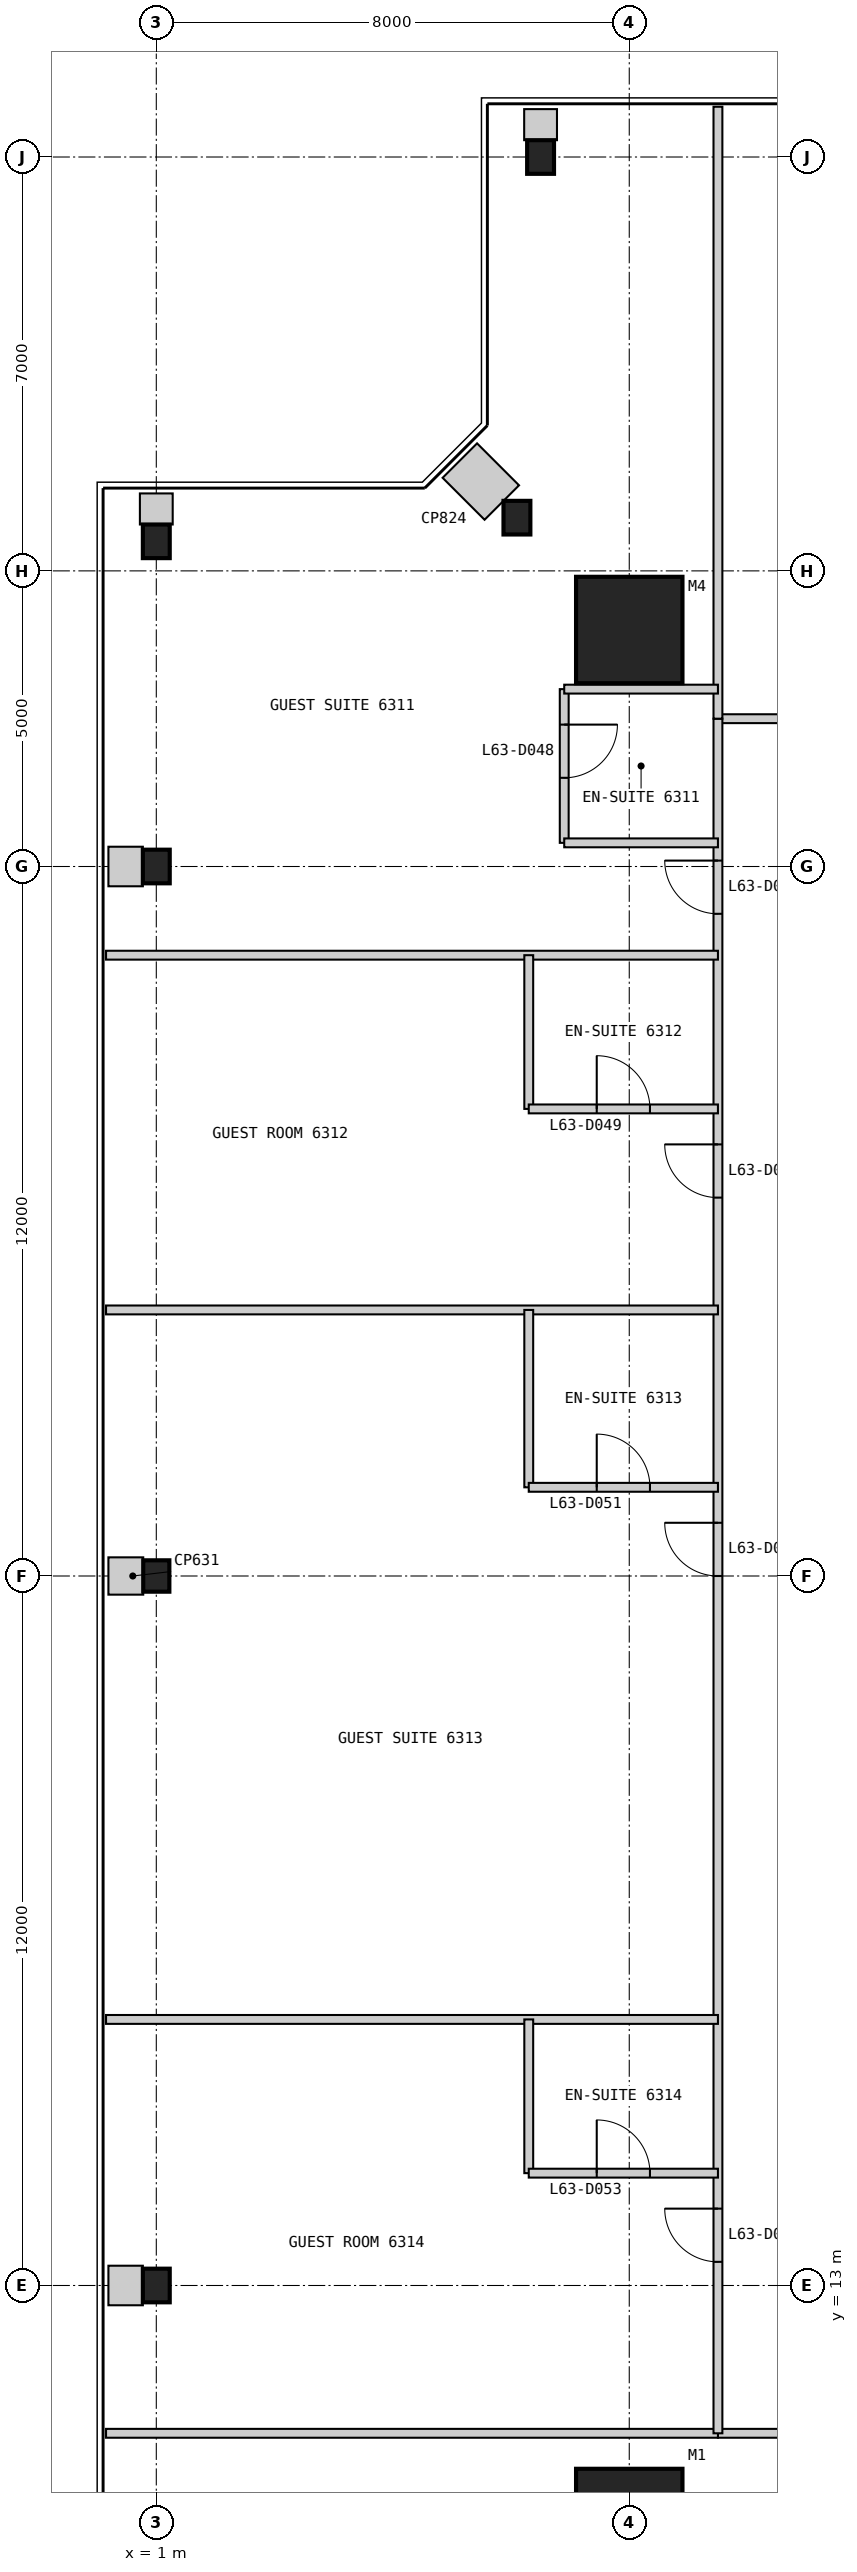
"""IFC4 building model, lengths in metres.
Left out: names, types, materials, properties, quantities, classifications, styles, units other than length and angle.
Written with IfcOpenShell. Run it as: python <this file> out.ifc"""

import sys

from ifc_helpers import new_model, si_unit, direction, frame, frame_2d, origin, origin_2d, place, context, subcontext, project, spatial, rectangle, i_section, extrude, element, fill, save


model = new_model("IFC4")
c1 = context("Model", 3, precision=1e-05, world=origin(), true_north=direction((0.0, 1.0)))
c2 = subcontext(c1, "Body", "Model", "MODEL_VIEW")
j1 = project(units=[si_unit("LENGTHUNIT", "METRE"), si_unit("PLANEANGLEUNIT", "RADIAN")], contexts=[c1])
p1 = place(None, origin())
s1 = spatial("IfcSite", under=j1, at=p1, CompositionType="ELEMENT")
p2 = place(p1, origin())
s2 = spatial("IfcBuilding", under=s1, at=p2, CompositionType="ELEMENT")
p3 = place(p2, frame((0.0, 0.0, 266.2)))
s3 = spatial("IfcBuildingStorey", under=s2, at=p3, CompositionType="ELEMENT", Elevation=266.2)
for number, where, z_axis, x_axis in (
    (1, (9.0, 9.0, 0.0), (0.0, 0.0, 1.0), (1.0, 0.0, 0.0)),
    (2, (9.0, 41.0, 0.0), (0.0, 0.0, 1.0), (1.0, 0.0, 0.0)),
):
    element("IfcColumn", number, at=place(p3, frame(where, z_axis=z_axis, x_axis=x_axis)), inside=s3, PredefinedType="COLUMN", context=c2, shape_type="SweptSolid", body=[
        extrude(rectangle(XDim=1.8, YDim=1.8, at=origin_2d()), origin(), (0.0, 0.0, 1.0), 3.4),
    ])
for number, where, z_axis, x_axis in (
    (3, (7.5, 49.0, 0.0), (0.0, 0.0, 1.0), (1.0, 0.0, 0.0)),
    (4, (7.1, 42.9, 0.0), (0.0, 0.0, 1.0), (1.0, 0.0, 0.0)),
    (5, (1.0, 42.5, 0.0), (0.0, 0.0, 1.0), (1.0, 0.0, 0.0)),
    (6, (1.0, 37.0, 0.0), (0.0, 0.0, 1.0), (1.0, 0.0, 0.0)),
):
    element("IfcColumn", number, at=place(p3, frame(where, z_axis=z_axis, x_axis=x_axis)), inside=s3, PredefinedType="COLUMN", context=c2, shape_type="SweptSolid", body=[
        extrude(i_section(OverallWidth=0.455, OverallDepth=0.569, WebThickness=0.078, FlangeThickness=0.125, at=origin_2d()), origin(), (0.0, 0.0, 1.0), 3.4),
    ])
p4 = place(p3, frame((1.0, 25.0, 0.0), z_axis=(0.0, 0.0, 1.0), x_axis=(1.0, 0.0, 0.0)))
e7 = element("IfcColumn", 7, at=p4, inside=s3, PredefinedType="COLUMN", context=c2, shape_type="SweptSolid", body=[
    extrude(i_section(OverallWidth=0.442, OverallDepth=0.531, WebThickness=0.066, FlangeThickness=0.106, at=origin_2d()), origin(), (0.0, 0.0, 1.0), 3.4),
])
p5 = place(p3, frame((1.0, 13.0, 0.0), z_axis=(0.0, 0.0, 1.0), x_axis=(1.0, 0.0, 0.0)))
e8 = element("IfcColumn", 8, at=p5, inside=s3, PredefinedType="COLUMN", context=c2, shape_type="SweptSolid", body=[
    extrude(i_section(OverallWidth=0.455, OverallDepth=0.569, WebThickness=0.078, FlangeThickness=0.125, at=origin_2d()), origin(), (0.0, 0.0, 1.0), 3.4),
])
p6 = place(p3, frame((10.5, 10.5, 0.0), z_axis=(0.0, 0.0, 1.0), x_axis=(1.0, 0.0, 0.0)))
e9 = element("IfcWall", 9, at=p6, inside=s3, PredefinedType="PARTITIONING", context=c2, shape_type="SweptSolid", body=[
    extrude(rectangle(XDim=29.0, YDim=0.15, at=frame_2d((14.5, 0.0))), origin(), (0.0, 0.0, 1.0), 3.25),
])
p7 = place(p6, frame((1.85, 0.0, 0.0)))
e10 = element("IfcOpeningElement", 10, at=p7, cuts=e9, PredefinedType="OPENING", context=c2, shape_type="SweptSolid", body=[
    extrude(rectangle(XDim=1.0, YDim=2.1, at=frame_2d((0.5, 1.05))), frame((0.0, 0.085, 0.0), z_axis=(0.0, -1.0, 0.0), x_axis=(1.0, 0.0, 0.0)), (0.0, 0.0, 1.0), 0.17),
])
p8 = place(p6, frame((14.5, 0.0, 0.0)))
e11 = element("IfcOpeningElement", 11, at=p8, cuts=e9, PredefinedType="OPENING", context=c2, shape_type="SweptSolid", body=[
    extrude(rectangle(XDim=1.0, YDim=2.1, at=frame_2d((0.5, 1.05))), frame((0.0, 0.085, 0.0), z_axis=(0.0, -1.0, 0.0), x_axis=(1.0, 0.0, 0.0)), (0.0, 0.0, 1.0), 0.17),
])
p9 = place(p6, frame((19.2, 0.0, 0.0)))
e12 = element("IfcOpeningElement", 12, at=p9, cuts=e9, PredefinedType="OPENING", context=c2, shape_type="SweptSolid", body=[
    extrude(rectangle(XDim=0.9, YDim=2.1, at=frame_2d((0.45, 1.05))), frame((0.0, 0.085, 0.0), z_axis=(0.0, -1.0, 0.0), x_axis=(1.0, 0.0, 0.0)), (0.0, 0.0, 1.0), 0.17),
])
p10 = place(p6, frame((25.2, 0.0, 0.0)))
e13 = element("IfcOpeningElement", 13, at=p10, cuts=e9, PredefinedType="OPENING", context=c2, shape_type="SweptSolid", body=[
    extrude(rectangle(XDim=0.9, YDim=2.1, at=frame_2d((0.45, 1.05))), frame((0.0, 0.085, 0.0), z_axis=(0.0, -1.0, 0.0), x_axis=(1.0, 0.0, 0.0)), (0.0, 0.0, 1.0), 0.17),
])
p11 = place(p3, frame((0.15, 10.5, 0.0), z_axis=(0.0, 0.0, 1.0), x_axis=(1.0, 0.0, 0.0)))
e14 = element("IfcWall", 14, at=p11, inside=s3, PredefinedType="PARTITIONING", context=c2, shape_type="SweptSolid", body=[
    extrude(rectangle(XDim=10.35, YDim=0.15, at=frame_2d((5.175, 0.0))), origin(), (0.0, 0.0, 1.0), 3.25),
])
p12 = place(p3, frame((39.5, 39.5, 0.0), z_axis=(0.0, 0.0, 1.0), x_axis=(-1.0, 0.0, 0.0)))
e15 = element("IfcWall", 15, at=p12, inside=s3, PredefinedType="PARTITIONING", context=c2, shape_type="SweptSolid", body=[
    extrude(rectangle(XDim=29.0, YDim=0.15, at=frame_2d((14.5, 0.0))), origin(), (0.0, 0.0, 1.0), 3.25),
])
p13 = place(p12, frame((2.575, 0.0, 0.0)))
e16 = element("IfcOpeningElement", 16, at=p13, cuts=e15, PredefinedType="OPENING", context=c2, shape_type="SweptSolid", body=[
    extrude(rectangle(XDim=0.9, YDim=2.1, at=frame_2d((0.45, 1.05))), frame((0.0, 0.085, 0.0), z_axis=(0.0, -1.0, 0.0), x_axis=(1.0, 0.0, 0.0)), (0.0, 0.0, 1.0), 0.17),
])
p14 = place(p12, frame((7.8, 0.0, 0.0)))
e17 = element("IfcOpeningElement", 17, at=p14, cuts=e15, PredefinedType="OPENING", context=c2, shape_type="SweptSolid", body=[
    extrude(rectangle(XDim=1.0, YDim=2.1, at=frame_2d((0.5, 1.05))), frame((0.0, 0.085, 0.0), z_axis=(0.0, -1.0, 0.0), x_axis=(1.0, 0.0, 0.0)), (0.0, 0.0, 1.0), 0.17),
])
p15 = place(p12, frame((13.6, 0.0, 0.0)))
e18 = element("IfcOpeningElement", 18, at=p15, cuts=e15, PredefinedType="OPENING", context=c2, shape_type="SweptSolid", body=[
    extrude(rectangle(XDim=0.9, YDim=2.1, at=frame_2d((0.45, 1.05))), frame((0.0, 0.085, 0.0), z_axis=(0.0, -1.0, 0.0), x_axis=(1.0, 0.0, 0.0)), (0.0, 0.0, 1.0), 0.17),
])
p16 = place(p12, frame((25.2, 0.0, 0.0)))
e19 = element("IfcOpeningElement", 19, at=p16, cuts=e15, PredefinedType="OPENING", context=c2, shape_type="SweptSolid", body=[
    extrude(rectangle(XDim=0.9, YDim=2.1, at=frame_2d((0.45, 1.05))), frame((0.0, 0.085, 0.0), z_axis=(0.0, -1.0, 0.0), x_axis=(1.0, 0.0, 0.0)), (0.0, 0.0, 1.0), 0.17),
])
p17 = place(p3, frame((10.5, 39.5, 0.0), z_axis=(0.0, 0.0, 1.0), x_axis=(0.0, -1.0, 0.0)))
e20 = element("IfcWall", 20, at=p17, inside=s3, PredefinedType="PARTITIONING", context=c2, shape_type="SweptSolid", body=[
    extrude(rectangle(XDim=29.0, YDim=0.15, at=frame_2d((14.5, 0.0))), origin(), (0.0, 0.0, 1.0), 3.25),
])
p18 = place(p17, frame((2.4, 0.0, 0.0)))
e21 = element("IfcOpeningElement", 21, at=p18, cuts=e20, PredefinedType="OPENING", context=c2, shape_type="SweptSolid", body=[
    extrude(rectangle(XDim=0.9, YDim=2.1, at=frame_2d((0.45, 1.05))), frame((0.0, 0.085, 0.0), z_axis=(0.0, -1.0, 0.0), x_axis=(1.0, 0.0, 0.0)), (0.0, 0.0, 1.0), 0.17),
])
p19 = place(p17, frame((7.2, 0.0, 0.0)))
e22 = element("IfcOpeningElement", 22, at=p19, cuts=e20, PredefinedType="OPENING", context=c2, shape_type="SweptSolid", body=[
    extrude(rectangle(XDim=0.9, YDim=2.1, at=frame_2d((0.45, 1.05))), frame((0.0, 0.085, 0.0), z_axis=(0.0, -1.0, 0.0), x_axis=(1.0, 0.0, 0.0)), (0.0, 0.0, 1.0), 0.17),
])
p20 = place(p17, frame((13.6, 0.0, 0.0)))
e23 = element("IfcOpeningElement", 23, at=p20, cuts=e20, PredefinedType="OPENING", context=c2, shape_type="SweptSolid", body=[
    extrude(rectangle(XDim=0.9, YDim=2.1, at=frame_2d((0.45, 1.05))), frame((0.0, 0.085, 0.0), z_axis=(0.0, -1.0, 0.0), x_axis=(1.0, 0.0, 0.0)), (0.0, 0.0, 1.0), 0.17),
])
p21 = place(p17, frame((25.2, 0.0, 0.0)))
e24 = element("IfcOpeningElement", 24, at=p21, cuts=e20, PredefinedType="OPENING", context=c2, shape_type="SweptSolid", body=[
    extrude(rectangle(XDim=0.9, YDim=2.1, at=frame_2d((0.45, 1.05))), frame((0.0, 0.085, 0.0), z_axis=(0.0, -1.0, 0.0), x_axis=(1.0, 0.0, 0.0)), (0.0, 0.0, 1.0), 0.17),
])
p22 = place(p3, frame((10.5, 49.85, 0.0), z_axis=(0.0, 0.0, 1.0), x_axis=(0.0, -1.0, 0.0)))
e25 = element("IfcWall", 25, at=p22, inside=s3, PredefinedType="PARTITIONING", context=c2, shape_type="SweptSolid", body=[
    extrude(rectangle(XDim=10.35, YDim=0.15, at=frame_2d((5.175, 0.0))), origin(), (0.0, 0.0, 1.0), 3.25),
])
p23 = place(p3, frame((7.9, 40.0, 0.0), z_axis=(0.0, 0.0, 1.0), x_axis=(0.0, -1.0, 0.0)))
e26 = element("IfcWall", 26, at=p23, inside=s3, PredefinedType="PARTITIONING", context=c2, shape_type="SweptSolid", body=[
    extrude(rectangle(XDim=2.6, YDim=0.15, at=frame_2d((1.3, 0.0))), origin(), (0.0, 0.0, 1.0), 3.25),
])
p24 = place(p23, frame((0.6, 0.0, 0.0)))
e27 = element("IfcOpeningElement", 27, at=p24, cuts=e26, PredefinedType="OPENING", context=c2, shape_type="SweptSolid", body=[
    extrude(rectangle(XDim=0.9, YDim=2.1, at=frame_2d((0.45, 1.05))), frame((0.0, 0.085, 0.0), z_axis=(0.0, -1.0, 0.0), x_axis=(1.0, 0.0, 0.0)), (0.0, 0.0, 1.0), 0.17),
])
for number, where, z_axis, x_axis in (
    (28, (7.9, 40.0, 0.0), (0.0, 0.0, 1.0), (1.0, 0.0, 0.0)),
    (29, (7.9, 37.4, 0.0), (0.0, 0.0, 1.0), (1.0, 0.0, 0.0)),
):
    element("IfcWall", number, at=place(p3, frame(where, z_axis=z_axis, x_axis=x_axis)), inside=s3, PredefinedType="PARTITIONING", context=c2, shape_type="SweptSolid", body=[
        extrude(rectangle(XDim=2.6, YDim=0.15, at=frame_2d((1.3, 0.0))), origin(), (0.0, 0.0, 1.0), 3.25),
    ])
p25 = place(p3, frame((0.15, 35.5, 0.0), z_axis=(0.0, 0.0, 1.0), x_axis=(1.0, 0.0, 0.0)))
e30 = element("IfcWall", 30, at=p25, inside=s3, PredefinedType="PARTITIONING", context=c2, shape_type="SweptSolid", body=[
    extrude(rectangle(XDim=10.35, YDim=0.15, at=frame_2d((5.175, 0.0))), origin(), (0.0, 0.0, 1.0), 3.25),
])
p26 = place(p3, frame((7.3, 35.5, 0.0), z_axis=(0.0, 0.0, 1.0), x_axis=(0.0, -1.0, 0.0)))
e31 = element("IfcWall", 31, at=p26, inside=s3, PredefinedType="PARTITIONING", context=c2, shape_type="SweptSolid", body=[
    extrude(rectangle(XDim=2.6, YDim=0.15, at=frame_2d((1.3, 0.0))), origin(), (0.0, 0.0, 1.0), 3.25),
])
p27 = place(p3, frame((7.3, 32.9, 0.0), z_axis=(0.0, 0.0, 1.0), x_axis=(1.0, 0.0, 0.0)))
e32 = element("IfcWall", 32, at=p27, inside=s3, PredefinedType="PARTITIONING", context=c2, shape_type="SweptSolid", body=[
    extrude(rectangle(XDim=3.2, YDim=0.15, at=frame_2d((1.6, 0.0))), origin(), (0.0, 0.0, 1.0), 3.25),
])
p28 = place(p27, frame((1.15, 0.0, 0.0)))
e33 = element("IfcOpeningElement", 33, at=p28, cuts=e32, PredefinedType="OPENING", context=c2, shape_type="SweptSolid", body=[
    extrude(rectangle(XDim=0.9, YDim=2.1, at=frame_2d((0.45, 1.05))), frame((0.0, 0.085, 0.0), z_axis=(0.0, -1.0, 0.0), x_axis=(1.0, 0.0, 0.0)), (0.0, 0.0, 1.0), 0.17),
])
p29 = place(p3, frame((0.15, 29.5, 0.0), z_axis=(0.0, 0.0, 1.0), x_axis=(1.0, 0.0, 0.0)))
e34 = element("IfcWall", 34, at=p29, inside=s3, PredefinedType="PARTITIONING", context=c2, shape_type="SweptSolid", body=[
    extrude(rectangle(XDim=10.35, YDim=0.15, at=frame_2d((5.175, 0.0))), origin(), (0.0, 0.0, 1.0), 3.25),
])
p30 = place(p3, frame((7.3, 29.5, 0.0), z_axis=(0.0, 0.0, 1.0), x_axis=(0.0, -1.0, 0.0)))
e35 = element("IfcWall", 35, at=p30, inside=s3, PredefinedType="PARTITIONING", context=c2, shape_type="SweptSolid", body=[
    extrude(rectangle(XDim=3.0, YDim=0.15, at=frame_2d((1.5, 0.0))), origin(), (0.0, 0.0, 1.0), 3.25),
])
p31 = place(p3, frame((7.3, 26.5, 0.0), z_axis=(0.0, 0.0, 1.0), x_axis=(1.0, 0.0, 0.0)))
e36 = element("IfcWall", 36, at=p31, inside=s3, PredefinedType="PARTITIONING", context=c2, shape_type="SweptSolid", body=[
    extrude(rectangle(XDim=3.2, YDim=0.15, at=frame_2d((1.6, 0.0))), origin(), (0.0, 0.0, 1.0), 3.25),
])
p32 = place(p31, frame((1.15, 0.0, 0.0)))
e37 = element("IfcOpeningElement", 37, at=p32, cuts=e36, PredefinedType="OPENING", context=c2, shape_type="SweptSolid", body=[
    extrude(rectangle(XDim=0.9, YDim=2.1, at=frame_2d((0.45, 1.05))), frame((0.0, 0.085, 0.0), z_axis=(0.0, -1.0, 0.0), x_axis=(1.0, 0.0, 0.0)), (0.0, 0.0, 1.0), 0.17),
])
p33 = place(p3, frame((0.15, 17.5, 0.0), z_axis=(0.0, 0.0, 1.0), x_axis=(1.0, 0.0, 0.0)))
e38 = element("IfcWall", 38, at=p33, inside=s3, PredefinedType="PARTITIONING", context=c2, shape_type="SweptSolid", body=[
    extrude(rectangle(XDim=10.35, YDim=0.15, at=frame_2d((5.175, 0.0))), origin(), (0.0, 0.0, 1.0), 3.25),
])
p34 = place(p3, frame((7.3, 17.5, 0.0), z_axis=(0.0, 0.0, 1.0), x_axis=(0.0, -1.0, 0.0)))
e39 = element("IfcWall", 39, at=p34, inside=s3, PredefinedType="PARTITIONING", context=c2, shape_type="SweptSolid", body=[
    extrude(rectangle(XDim=2.6, YDim=0.15, at=frame_2d((1.3, 0.0))), origin(), (0.0, 0.0, 1.0), 3.25),
])
p35 = place(p3, frame((7.3, 14.9, 0.0), z_axis=(0.0, 0.0, 1.0), x_axis=(1.0, 0.0, 0.0)))
e40 = element("IfcWall", 40, at=p35, inside=s3, PredefinedType="PARTITIONING", context=c2, shape_type="SweptSolid", body=[
    extrude(rectangle(XDim=3.2, YDim=0.15, at=frame_2d((1.6, 0.0))), origin(), (0.0, 0.0, 1.0), 3.25),
])
p36 = place(p35, frame((1.15, 0.0, 0.0)))
e41 = element("IfcOpeningElement", 41, at=p36, cuts=e40, PredefinedType="OPENING", context=c2, shape_type="SweptSolid", body=[
    extrude(rectangle(XDim=0.9, YDim=2.1, at=frame_2d((0.45, 1.05))), frame((0.0, 0.085, 0.0), z_axis=(0.0, -1.0, 0.0), x_axis=(1.0, 0.0, 0.0)), (0.0, 0.0, 1.0), 0.17),
])
p37 = place(p3, frame((7.5, 49.81, 0.0), z_axis=(0.0, 0.0, 1.0), x_axis=(0.0, -1.0, 0.0)))
e42 = element("IfcWall", 42, at=p37, inside=s3, PredefinedType="PARTITIONING", context=c2, shape_type="SweptSolid", body=[
    extrude(rectangle(XDim=0.526, YDim=0.555, at=frame_2d((0.263, 0.0))), origin(), (0.0, 0.0, 1.0), 3.25),
])
p38 = place(p3, frame((6.134, 43.866, 0.0), z_axis=(0.0, 0.0, 1.0), x_axis=(0.707106781187, -0.707106781187, 0.0)))
e43 = element("IfcWall", 43, at=p38, inside=s3, PredefinedType="PARTITIONING", context=c2, shape_type="SweptSolid", body=[
    extrude(rectangle(XDim=1.004, YDim=0.824, at=frame_2d((0.502, 0.0))), origin(), (0.0, 0.0, 1.0), 3.25),
])
p39 = place(p3, frame((1.0, 43.31, 0.0), z_axis=(0.0, 0.0, 1.0), x_axis=(0.0, -1.0, 0.0)))
e44 = element("IfcWall", 44, at=p39, inside=s3, PredefinedType="PARTITIONING", context=c2, shape_type="SweptSolid", body=[
    extrude(rectangle(XDim=0.526, YDim=0.555, at=frame_2d((0.263, 0.0))), origin(), (0.0, 0.0, 1.0), 3.25),
])
p40 = place(p3, frame((0.19, 37.0, 0.0), z_axis=(0.0, 0.0, 1.0), x_axis=(1.0, 0.0, 0.0)))
e45 = element("IfcWall", 45, at=p40, inside=s3, PredefinedType="PARTITIONING", context=c2, shape_type="SweptSolid", body=[
    extrude(rectangle(XDim=0.583, YDim=0.669, at=frame_2d((0.292, 0.0))), origin(), (0.0, 0.0, 1.0), 3.25),
])
p41 = place(p3, frame((0.19, 25.0, 0.0), z_axis=(0.0, 0.0, 1.0), x_axis=(1.0, 0.0, 0.0)))
e46 = element("IfcWall", 46, at=p41, inside=s3, PredefinedType="PARTITIONING", context=c2, shape_type="SweptSolid", body=[
    extrude(rectangle(XDim=0.589, YDim=0.631, at=frame_2d((0.294, 0.0))), origin(), (0.0, 0.0, 1.0), 3.25),
])
p42 = place(p3, frame((0.19, 13.0, 0.0), z_axis=(0.0, 0.0, 1.0), x_axis=(1.0, 0.0, 0.0)))
e47 = element("IfcWall", 47, at=p42, inside=s3, PredefinedType="PARTITIONING", context=c2, shape_type="SweptSolid", body=[
    extrude(rectangle(XDim=0.583, YDim=0.669, at=frame_2d((0.292, 0.0))), origin(), (0.0, 0.0, 1.0), 3.25),
])
p43 = place(p18, frame((0.9, 0.0, 0.0), z_axis=(0.0, 0.0, 1.0), x_axis=(-1.0, 0.0, 0.0)))
e48 = element("IfcDoor", 48, at=p43, inside=s3, OperationType="SINGLE_SWING_RIGHT", PredefinedType="DOOR", context=c2, shape_type="SweptSolid", body=[
    extrude(rectangle(XDim=0.9, YDim=2.1, at=frame_2d((0.45, 1.05))), frame((0.0, 0.025, 0.0), z_axis=(0.0, -1.0, 0.0), x_axis=(1.0, 0.0, 0.0)), (0.0, 0.0, 1.0), 0.05),
])
fill(e21, e48)
p44 = place(p24, origin())
e49 = element("IfcDoor", 49, at=p44, inside=s3, OperationType="SINGLE_SWING_LEFT", PredefinedType="DOOR", context=c2, shape_type="SweptSolid", body=[
    extrude(rectangle(XDim=0.9, YDim=2.1, at=frame_2d((0.45, 1.05))), frame((0.0, 0.025, 0.0), z_axis=(0.0, -1.0, 0.0), x_axis=(1.0, 0.0, 0.0)), (0.0, 0.0, 1.0), 0.05),
])
fill(e27, e49)
p45 = place(p28, origin())
e50 = element("IfcDoor", 50, at=p45, inside=s3, OperationType="SINGLE_SWING_LEFT", PredefinedType="DOOR", context=c2, shape_type="SweptSolid", body=[
    extrude(rectangle(XDim=0.9, YDim=2.1, at=frame_2d((0.45, 1.05))), frame((0.0, 0.025, 0.0), z_axis=(0.0, -1.0, 0.0), x_axis=(1.0, 0.0, 0.0)), (0.0, 0.0, 1.0), 0.05),
])
fill(e33, e50)
p46 = place(p19, frame((0.9, 0.0, 0.0), z_axis=(0.0, 0.0, 1.0), x_axis=(-1.0, 0.0, 0.0)))
e51 = element("IfcDoor", 51, at=p46, inside=s3, OperationType="SINGLE_SWING_RIGHT", PredefinedType="DOOR", context=c2, shape_type="SweptSolid", body=[
    extrude(rectangle(XDim=0.9, YDim=2.1, at=frame_2d((0.45, 1.05))), frame((0.0, 0.025, 0.0), z_axis=(0.0, -1.0, 0.0), x_axis=(1.0, 0.0, 0.0)), (0.0, 0.0, 1.0), 0.05),
])
fill(e22, e51)
p47 = place(p32, origin())
e52 = element("IfcDoor", 52, at=p47, inside=s3, OperationType="SINGLE_SWING_LEFT", PredefinedType="DOOR", context=c2, shape_type="SweptSolid", body=[
    extrude(rectangle(XDim=0.9, YDim=2.1, at=frame_2d((0.45, 1.05))), frame((0.0, 0.025, 0.0), z_axis=(0.0, -1.0, 0.0), x_axis=(1.0, 0.0, 0.0)), (0.0, 0.0, 1.0), 0.05),
])
fill(e37, e52)
p48 = place(p20, frame((0.9, 0.0, 0.0), z_axis=(0.0, 0.0, 1.0), x_axis=(-1.0, 0.0, 0.0)))
e53 = element("IfcDoor", 53, at=p48, inside=s3, OperationType="SINGLE_SWING_RIGHT", PredefinedType="DOOR", context=c2, shape_type="SweptSolid", body=[
    extrude(rectangle(XDim=0.9, YDim=2.1, at=frame_2d((0.45, 1.05))), frame((0.0, 0.025, 0.0), z_axis=(0.0, -1.0, 0.0), x_axis=(1.0, 0.0, 0.0)), (0.0, 0.0, 1.0), 0.05),
])
fill(e23, e53)
p49 = place(p36, origin())
e54 = element("IfcDoor", 54, at=p49, inside=s3, OperationType="SINGLE_SWING_LEFT", PredefinedType="DOOR", context=c2, shape_type="SweptSolid", body=[
    extrude(rectangle(XDim=0.9, YDim=2.1, at=frame_2d((0.45, 1.05))), frame((0.0, 0.025, 0.0), z_axis=(0.0, -1.0, 0.0), x_axis=(1.0, 0.0, 0.0)), (0.0, 0.0, 1.0), 0.05),
])
fill(e41, e54)
p50 = place(p21, frame((0.9, 0.0, 0.0), z_axis=(0.0, 0.0, 1.0), x_axis=(-1.0, 0.0, 0.0)))
e55 = element("IfcDoor", 55, at=p50, inside=s3, OperationType="SINGLE_SWING_RIGHT", PredefinedType="DOOR", context=c2, shape_type="SweptSolid", body=[
    extrude(rectangle(XDim=0.9, YDim=2.1, at=frame_2d((0.45, 1.05))), frame((0.0, 0.025, 0.0), z_axis=(0.0, -1.0, 0.0), x_axis=(1.0, 0.0, 0.0)), (0.0, 0.0, 1.0), 0.05),
])
fill(e24, e55)
save(model, sys.argv[1])
